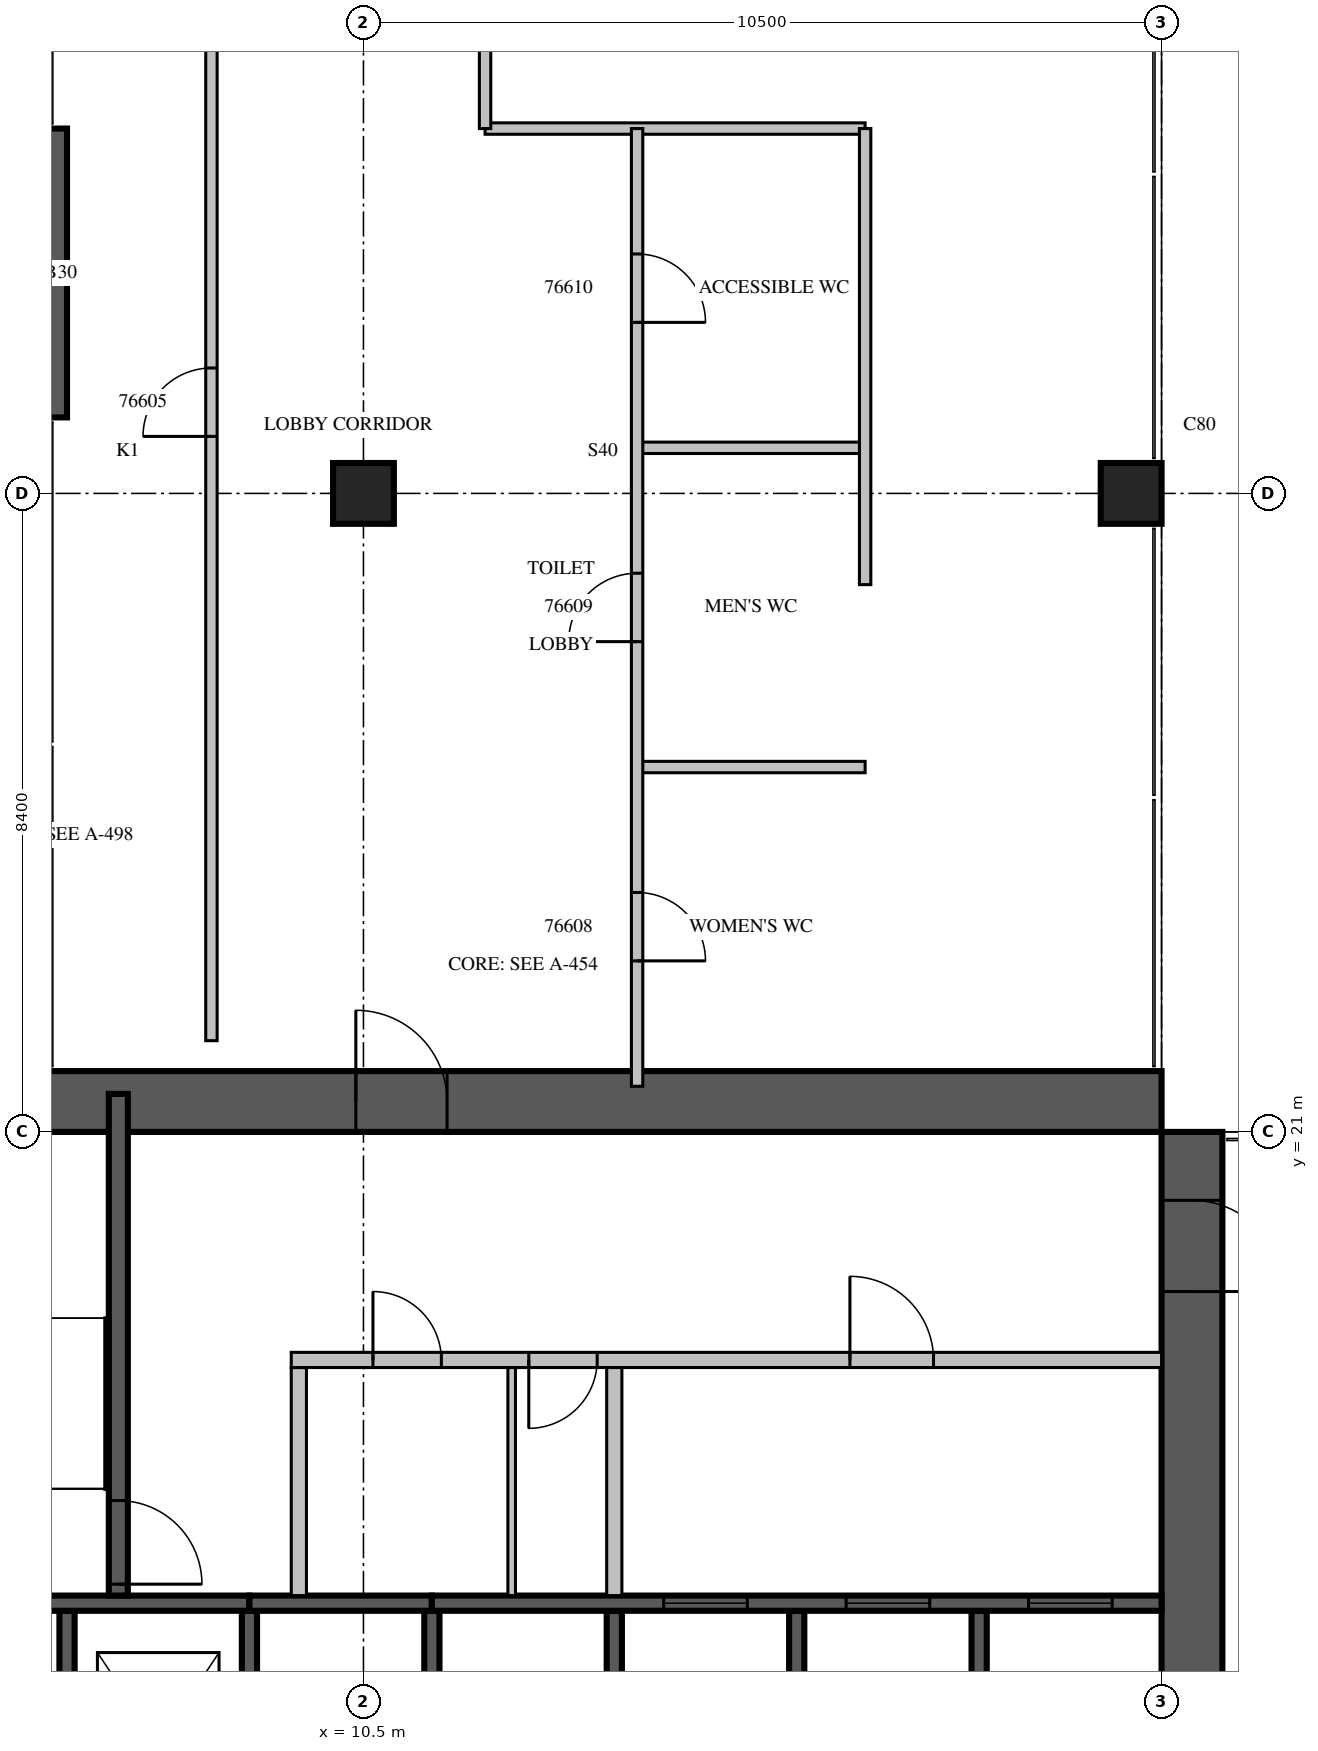
"""IFC4 building model, lengths in metres.
Left out: names, types, materials, properties, quantities, classifications, styles, units other than length and angle.
Written with IfcOpenShell. Run it as: python <this file> out.ifc"""

import sys

from ifc_helpers import new_model, si_unit, direction, frame, frame_2d, origin, origin_2d, place, context, subcontext, project, spatial, rectangle, extrude, source, transform, mapped, element, fill, save


model = new_model("IFC4")
c1 = context("Model", 3, precision=1e-05, world=origin(), true_north=direction((0.0, 1.0)))
c2 = subcontext(c1, "Body", "Model", "MODEL_VIEW")
j1 = project(units=[si_unit("LENGTHUNIT", "METRE"), si_unit("PLANEANGLEUNIT", "RADIAN")], contexts=[c1])
p1 = place(None, origin())
s1 = spatial("IfcSite", under=j1, at=p1, CompositionType="ELEMENT")
p2 = place(p1, origin())
s2 = spatial("IfcBuilding", under=s1, at=p2, CompositionType="ELEMENT")
p3 = place(p2, frame((0.0, 0.0, 277.0)))
s3 = spatial("IfcBuildingStorey", under=s2, at=p3, CompositionType="ELEMENT", Elevation=277.0)
m1 = source(origin(), c2, "Body", "SweptSolid", [
    extrude(rectangle(XDim=0.8, YDim=0.8, at=origin_2d()), origin(), (0.0, 0.0, 1.0), 7.5),
])
for number, where, z_axis, x_axis in (
    (1, (10.5, 29.4, 0.0), (0.0, 0.0, 1.0), (1.0, 0.0, 0.0)),
    (2, (20.6, 29.4, 0.0), (0.0, 0.0, 1.0), (1.0, 0.0, 0.0)),
):
    element("IfcColumn", number, at=place(p3, frame(where, z_axis=z_axis, x_axis=x_axis)), inside=s3, PredefinedType="COLUMN", context=c2, shape_type="MappedRepresentation", body=[
        mapped(m1, transform((0.0, 0.0, 0.0), scale=1.0)),
    ])
p4 = place(p3, frame((21.4, 4.2, 0.0), z_axis=(0.0, 0.0, 1.0), x_axis=(0.0, 1.0, 0.0)))
e3 = element("IfcWall", 3, at=p4, inside=s3, PredefinedType="SHEAR", context=c2, shape_type="SweptSolid", body=[
    extrude(rectangle(XDim=16.8, YDim=0.8, at=frame_2d((8.4, 0.0))), origin(), (0.0, 0.0, 1.0), 7.5),
])
m2 = source(origin(), c2, "Body", "SweptSolid", [
    extrude(rectangle(XDim=2.2, YDim=2.1, at=frame_2d((1.1, 1.05))), frame((0.0, 0.41, 0.0), z_axis=(0.0, -1.0, 0.0), x_axis=(1.0, 0.0, 0.0)), (0.0, 0.0, 1.0), 0.82),
])
p5 = place(p4, frame((4.2, 0.0, 0.0)))
e4 = element("IfcOpeningElement", 4, at=p5, cuts=e3, PredefinedType="OPENING", context=c2, shape_type="MappedRepresentation", body=[
    mapped(m2, transform((0.0, 0.0, 0.0), scale=1.0)),
])
m3 = source(origin(), c2, "Body", "SweptSolid", [
    extrude(rectangle(XDim=1.2, YDim=2.1, at=frame_2d((0.6, 1.05))), frame((0.0, 0.41, 0.0), z_axis=(0.0, -1.0, 0.0), x_axis=(1.0, 0.0, 0.0)), (0.0, 0.0, 1.0), 0.82),
])
p6 = place(p4, frame((14.7, 0.0, 0.0)))
e5 = element("IfcOpeningElement", 5, at=p6, cuts=e3, PredefinedType="OPENING", context=c2, shape_type="MappedRepresentation", body=[
    mapped(m3, transform((0.0, 0.0, 0.0), scale=1.0)),
])
m4 = source(origin(), c2, "Body", "SweptSolid", [
    extrude(rectangle(XDim=16.8, YDim=0.8, at=frame_2d((8.4, 0.0))), origin(), (0.0, 0.0, 1.0), 7.5),
])
p7 = place(p3, frame((4.2, 21.4, 0.0), z_axis=(0.0, 0.0, 1.0), x_axis=(1.0, 0.0, 0.0)))
e6 = element("IfcWall", 6, at=p7, inside=s3, PredefinedType="SHEAR", context=c2, shape_type="MappedRepresentation", body=[
    mapped(m4, transform((0.0, 0.0, 0.0), scale=1.0)),
])
p8 = place(p7, frame((6.2, 0.0, 0.0)))
e7 = element("IfcOpeningElement", 7, at=p8, cuts=e6, PredefinedType="OPENING", context=c2, shape_type="MappedRepresentation", body=[
    mapped(m3, transform((0.0, 0.0, 0.0), scale=1.0)),
])
m5 = source(origin(), c2, "Body", "SweptSolid", [
    extrude(rectangle(XDim=3.8, YDim=0.3, at=frame_2d((1.9, 0.0))), origin(), (0.0, 0.0, 1.0), 7.1),
])
p9 = place(p3, frame((6.45, 34.2, 0.0), z_axis=(0.0, 0.0, 1.0), x_axis=(0.0, -1.0, 0.0)))
e8 = element("IfcWall", 8, at=p9, inside=s3, PredefinedType="SOLIDWALL", context=c2, shape_type="MappedRepresentation", body=[
    mapped(m5, transform((0.0, 0.0, 0.0), scale=1.0)),
])
m6 = source(origin(), c2, "Body", "SweptSolid", [
    extrude(rectangle(XDim=3.0, YDim=0.2, at=frame_2d((1.5, 0.0))), origin(), (0.0, 0.0, 1.0), 7.5),
])
p10 = place(p3, frame((6.6, 11.7, 0.0), z_axis=(0.0, 0.0, 1.0), x_axis=(0.0, 1.0, 0.0)))
e9 = element("IfcWall", 9, at=p10, inside=s3, PredefinedType="SOLIDWALL", context=c2, shape_type="MappedRepresentation", body=[
    mapped(m6, transform((0.0, 0.0, 0.0), scale=1.0)),
])
m7 = source(origin(), c2, "Body", "SweptSolid", [
    extrude(rectangle(XDim=3.0, YDim=0.2, at=frame_2d((1.5, 0.0))), origin(), (0.0, 0.0, 1.0), 7.1),
])
for number, where, z_axis, x_axis in (
    (10, (9.0, 11.7, 0.0), (0.0, 0.0, 1.0), (0.0, 1.0, 0.0)),
    (11, (11.4, 11.7, 0.0), (0.0, 0.0, 1.0), (0.0, 1.0, 0.0)),
):
    element("IfcWall", number, at=place(p3, frame(where, z_axis=z_axis, x_axis=x_axis)), inside=s3, PredefinedType="SOLIDWALL", context=c2, shape_type="MappedRepresentation", body=[
        mapped(m7, transform((0.0, 0.0, 0.0), scale=1.0)),
    ])
for number, where, z_axis, x_axis in (
    (12, (13.8, 11.7, 0.0), (0.0, 0.0, 1.0), (0.0, 1.0, 0.0)),
    (13, (16.2, 11.7, 0.0), (0.0, 0.0, 1.0), (0.0, 1.0, 0.0)),
    (14, (18.6, 11.7, 0.0), (0.0, 0.0, 1.0), (0.0, 1.0, 0.0)),
):
    element("IfcWall", number, at=place(p3, frame(where, z_axis=z_axis, x_axis=x_axis)), inside=s3, PredefinedType="SOLIDWALL", context=c2, shape_type="MappedRepresentation", body=[
        mapped(m6, transform((0.0, 0.0, 0.0), scale=1.0)),
    ])
m8 = source(origin(), c2, "Body", "SweptSolid", [
    extrude(rectangle(XDim=4.8, YDim=0.2, at=frame_2d((2.4, 0.0))), origin(), (0.0, 0.0, 1.0), 7.5),
])
p11 = place(p3, frame((4.2, 14.8, 0.0), z_axis=(0.0, 0.0, 1.0), x_axis=(1.0, 0.0, 0.0)))
e15 = element("IfcWall", 15, at=p11, inside=s3, PredefinedType="SOLIDWALL", context=c2, shape_type="MappedRepresentation", body=[
    mapped(m8, transform((0.0, 0.0, 0.0), scale=1.0)),
])
m9 = source(origin(), c2, "Body", "SweptSolid", [
    extrude(rectangle(XDim=2.4, YDim=0.2, at=frame_2d((1.2, 0.0))), origin(), (0.0, 0.0, 1.0), 7.1),
])
p12 = place(p3, frame((9.0, 14.8, 0.0), z_axis=(0.0, 0.0, 1.0), x_axis=(1.0, 0.0, 0.0)))
e16 = element("IfcWall", 16, at=p12, inside=s3, PredefinedType="SOLIDWALL", context=c2, shape_type="MappedRepresentation", body=[
    mapped(m9, transform((0.0, 0.0, 0.0), scale=1.0)),
])
m10 = source(origin(), c2, "Body", "SweptSolid", [
    extrude(rectangle(XDim=9.6, YDim=0.2, at=frame_2d((4.8, 0.0))), origin(), (0.0, 0.0, 1.0), 7.5),
])
p13 = place(p3, frame((11.4, 14.8, 0.0), z_axis=(0.0, 0.0, 1.0), x_axis=(1.0, 0.0, 0.0)))
e17 = element("IfcWall", 17, at=p13, inside=s3, PredefinedType="SOLIDWALL", context=c2, shape_type="MappedRepresentation", body=[
    mapped(m10, transform((0.0, 0.0, 0.0), scale=1.0)),
])
m11 = source(origin(), c2, "Body", "SweptSolid", [
    extrude(rectangle(XDim=1.1, YDim=2.1, at=frame_2d((0.55, 1.05))), frame((0.0, 0.11, 0.0), z_axis=(0.0, -1.0, 0.0), x_axis=(1.0, 0.0, 0.0)), (0.0, 0.0, 1.0), 0.22),
])
p14 = place(p13, frame((3.05, 0.0, 0.0)))
e18 = element("IfcOpeningElement", 18, at=p14, cuts=e17, PredefinedType="OPENING", context=c2, shape_type="MappedRepresentation", body=[
    mapped(m11, transform((0.0, 0.0, 0.0), scale=1.0)),
])
p15 = place(p13, frame((5.45, 0.0, 0.0)))
e19 = element("IfcOpeningElement", 19, at=p15, cuts=e17, PredefinedType="OPENING", context=c2, shape_type="MappedRepresentation", body=[
    mapped(m11, transform((0.0, 0.0, 0.0), scale=1.0)),
])
p16 = place(p13, frame((7.85, 0.0, 0.0)))
e20 = element("IfcOpeningElement", 20, at=p16, cuts=e17, PredefinedType="OPENING", context=c2, shape_type="MappedRepresentation", body=[
    mapped(m11, transform((0.0, 0.0, 0.0), scale=1.0)),
])
m12 = source(origin(), c2, "Body", "SweptSolid", [
    extrude(rectangle(XDim=6.6, YDim=0.25, at=frame_2d((3.3, 0.0))), origin(), (0.0, 0.0, 1.0), 7.1),
])
p17 = place(p3, frame((7.275, 14.9, 0.0), z_axis=(0.0, 0.0, 1.0), x_axis=(0.0, 1.0, 0.0)))
e21 = element("IfcWall", 21, at=p17, inside=s3, PredefinedType="SOLIDWALL", context=c2, shape_type="MappedRepresentation", body=[
    mapped(m12, transform((0.0, 0.0, 0.0), scale=1.0)),
])
m13 = source(origin(), c2, "Body", "SweptSolid", [
    extrude(rectangle(XDim=1.1, YDim=2.1, at=frame_2d((0.55, 1.05))), frame((0.0, 0.135, 0.0), z_axis=(0.0, -1.0, 0.0), x_axis=(1.0, 0.0, 0.0)), (0.0, 0.0, 1.0), 0.27),
])
p18 = place(p17, frame((0.15, 0.0, 0.0)))
e22 = element("IfcOpeningElement", 22, at=p18, cuts=e21, PredefinedType="OPENING", context=c2, shape_type="MappedRepresentation", body=[
    mapped(m13, transform((0.0, 0.0, 0.0), scale=1.0)),
])
m14 = source(origin(), c2, "Body", "SweptSolid", [
    extrude(rectangle(XDim=3.0, YDim=0.2, at=frame_2d((1.5, 0.0))), origin(), (0.0, 0.0, 1.0), 7.1),
])
p19 = place(p3, frame((9.65, 14.9, 0.0), z_axis=(0.0, 0.0, 1.0), x_axis=(0.0, 1.0, 0.0)))
e23 = element("IfcWall", 23, at=p19, inside=s3, PredefinedType="PARTITIONING", context=c2, shape_type="MappedRepresentation", body=[
    mapped(m14, transform((0.0, 0.0, 0.0), scale=1.0)),
])
m15 = source(origin(), c2, "Body", "SweptSolid", [
    extrude(rectangle(XDim=11.45, YDim=0.2, at=frame_2d((5.725, 0.0))), origin(), (0.0, 0.0, 1.0), 7.1),
])
p20 = place(p3, frame((9.55, 18.0, 0.0), z_axis=(0.0, 0.0, 1.0), x_axis=(1.0, 0.0, 0.0)))
e24 = element("IfcWall", 24, at=p20, inside=s3, PredefinedType="PARTITIONING", context=c2, shape_type="MappedRepresentation", body=[
    mapped(m15, transform((0.0, 0.0, 0.0), scale=1.0)),
])
m16 = source(origin(), c2, "Body", "SweptSolid", [
    extrude(rectangle(XDim=0.9, YDim=2.1, at=frame_2d((0.45, 1.05))), frame((0.0, 0.11, 0.0), z_axis=(0.0, -1.0, 0.0), x_axis=(1.0, 0.0, 0.0)), (0.0, 0.0, 1.0), 0.22),
])
p21 = place(p20, frame((1.075, 0.0, 0.0)))
e25 = element("IfcOpeningElement", 25, at=p21, cuts=e24, PredefinedType="OPENING", context=c2, shape_type="MappedRepresentation", body=[
    mapped(m16, transform((0.0, 0.0, 0.0), scale=1.0)),
])
p22 = place(p20, frame((3.125, 0.0, 0.0)))
e26 = element("IfcOpeningElement", 26, at=p22, cuts=e24, PredefinedType="OPENING", context=c2, shape_type="MappedRepresentation", body=[
    mapped(m16, transform((0.0, 0.0, 0.0), scale=1.0)),
])
p23 = place(p20, frame((7.35, 0.0, 0.0)))
e27 = element("IfcOpeningElement", 27, at=p23, cuts=e24, PredefinedType="OPENING", context=c2, shape_type="MappedRepresentation", body=[
    mapped(m11, transform((0.0, 0.0, 0.0), scale=1.0)),
])
p24 = place(p3, frame((13.8, 14.9, 0.0), z_axis=(0.0, 0.0, 1.0), x_axis=(0.0, 1.0, 0.0)))
e28 = element("IfcWall", 28, at=p24, inside=s3, PredefinedType="PARTITIONING", context=c2, shape_type="MappedRepresentation", body=[
    mapped(m14, transform((0.0, 0.0, 0.0), scale=1.0)),
])
m17 = source(origin(), c2, "Body", "SweptSolid", [
    extrude(rectangle(XDim=3.0, YDim=0.1, at=frame_2d((1.5, 0.0))), origin(), (0.0, 0.0, 1.0), 7.1),
])
p25 = place(p3, frame((12.45, 14.9, 0.0), z_axis=(0.0, 0.0, 1.0), x_axis=(0.0, 1.0, 0.0)))
e29 = element("IfcWall", 29, at=p25, inside=s3, PredefinedType="PARTITIONING", context=c2, shape_type="MappedRepresentation", body=[
    mapped(m17, transform((0.0, 0.0, 0.0), scale=1.0)),
])
m18 = source(origin(), c2, "Body", "SweptSolid", [
    extrude(rectangle(XDim=3.0, YDim=0.15, at=frame_2d((1.5, 0.0))), origin(), (0.0, 0.0, 1.0), 7.1),
])
for number, where, z_axis, x_axis in (
    (30, (14.1, 25.8, 0.0), (0.0, 0.0, 1.0), (1.0, 0.0, 0.0)),
    (31, (14.1, 30.0, 0.0), (0.0, 0.0, 1.0), (1.0, 0.0, 0.0)),
):
    element("IfcWall", number, at=place(p3, frame(where, z_axis=z_axis, x_axis=x_axis)), inside=s3, PredefinedType="PARTITIONING", context=c2, shape_type="MappedRepresentation", body=[
        mapped(m18, transform((0.0, 0.0, 0.0), scale=1.0)),
    ])
m19 = source(origin(), c2, "Body", "SweptSolid", [
    extrude(rectangle(XDim=5.0, YDim=0.15, at=frame_2d((2.5, 0.0))), origin(), (0.0, 0.0, 1.0), 7.1),
])
p26 = place(p3, frame((12.1, 34.2, 0.0), z_axis=(0.0, 0.0, 1.0), x_axis=(1.0, 0.0, 0.0)))
e32 = element("IfcWall", 32, at=p26, inside=s3, PredefinedType="PARTITIONING", context=c2, shape_type="MappedRepresentation", body=[
    mapped(m19, transform((0.0, 0.0, 0.0), scale=1.0)),
])
m20 = source(origin(), c2, "Body", "SweptSolid", [
    extrude(rectangle(XDim=16.2, YDim=0.15, at=frame_2d((8.1, 0.0))), origin(), (0.0, 0.0, 1.0), 7.1),
])
p27 = place(p3, frame((8.5, 22.2, 0.0), z_axis=(0.0, 0.0, 1.0), x_axis=(0.0, 1.0, 0.0)))
e33 = element("IfcWall", 33, at=p27, inside=s3, PredefinedType="PARTITIONING", context=c2, shape_type="MappedRepresentation", body=[
    mapped(m20, transform((0.0, 0.0, 0.0), scale=1.0)),
])
m21 = source(origin(), c2, "Body", "SweptSolid", [
    extrude(rectangle(XDim=0.9, YDim=2.1, at=frame_2d((0.45, 1.05))), frame((0.0, 0.085, 0.0), z_axis=(0.0, -1.0, 0.0), x_axis=(1.0, 0.0, 0.0)), (0.0, 0.0, 1.0), 0.17),
])
p28 = place(p27, frame((7.95, 0.0, 0.0)))
e34 = element("IfcOpeningElement", 34, at=p28, cuts=e33, PredefinedType="OPENING", context=c2, shape_type="MappedRepresentation", body=[
    mapped(m21, transform((0.0, 0.0, 0.0), scale=1.0)),
])
p29 = place(p3, frame((12.1, 34.2, 0.0), z_axis=(0.0, 0.0, 1.0), x_axis=(0.0, 1.0, 0.0)))
e35 = element("IfcWall", 35, at=p29, inside=s3, PredefinedType="PARTITIONING", context=c2, shape_type="SweptSolid", body=[
    extrude(rectangle(XDim=4.2, YDim=0.15, at=frame_2d((2.1, 0.0))), origin(), (0.0, 0.0, 1.0), 7.1),
])
m22 = source(origin(), c2, "Body", "SweptSolid", [
    extrude(rectangle(XDim=12.6, YDim=0.15, at=frame_2d((6.3, 0.0))), origin(), (0.0, 0.0, 1.0), 7.1),
])
p30 = place(p3, frame((14.1, 21.6, 0.0), z_axis=(0.0, 0.0, 1.0), x_axis=(0.0, 1.0, 0.0)))
e36 = element("IfcWall", 36, at=p30, inside=s3, PredefinedType="PARTITIONING", context=c2, shape_type="MappedRepresentation", body=[
    mapped(m22, transform((0.0, 0.0, 0.0), scale=1.0)),
])
p31 = place(p30, frame((1.65, 0.0, 0.0)))
e37 = element("IfcOpeningElement", 37, at=p31, cuts=e36, PredefinedType="OPENING", context=c2, shape_type="MappedRepresentation", body=[
    mapped(m21, transform((0.0, 0.0, 0.0), scale=1.0)),
])
p32 = place(p30, frame((5.85, 0.0, 0.0)))
e38 = element("IfcOpeningElement", 38, at=p32, cuts=e36, PredefinedType="OPENING", context=c2, shape_type="MappedRepresentation", body=[
    mapped(m21, transform((0.0, 0.0, 0.0), scale=1.0)),
])
p33 = place(p30, frame((10.05, 0.0, 0.0)))
e39 = element("IfcOpeningElement", 39, at=p33, cuts=e36, PredefinedType="OPENING", context=c2, shape_type="MappedRepresentation", body=[
    mapped(m21, transform((0.0, 0.0, 0.0), scale=1.0)),
])
m23 = source(origin(), c2, "Body", "SweptSolid", [
    extrude(rectangle(XDim=6.0, YDim=0.15, at=frame_2d((3.0, 0.0))), origin(), (0.0, 0.0, 1.0), 7.1),
])
p34 = place(p3, frame((17.1, 28.2, 0.0), z_axis=(0.0, 0.0, 1.0), x_axis=(0.0, 1.0, 0.0)))
e40 = element("IfcWall", 40, at=p34, inside=s3, PredefinedType="PARTITIONING", context=c2, shape_type="MappedRepresentation", body=[
    mapped(m23, transform((0.0, 0.0, 0.0), scale=1.0)),
])
m24 = source(origin(), c2, "Body", "SweptSolid", [
    extrude(rectangle(XDim=1.1, YDim=2.1, at=frame_2d((0.55, 1.05))), frame((0.0, 0.025, 0.0), z_axis=(0.0, -1.0, 0.0), x_axis=(1.0, 0.0, 0.0)), (0.0, 0.0, 1.0), 0.05),
])
p35 = place(p14, origin())
e41 = element("IfcDoor", 41, at=p35, inside=s3, OperationType="SLIDING_TO_LEFT", PredefinedType="DOOR", context=c2, shape_type="MappedRepresentation", body=[
    mapped(m24, transform((0.0, 0.0, 0.0), scale=1.0)),
])
fill(e18, e41)
p36 = place(p15, origin())
e42 = element("IfcDoor", 42, at=p36, inside=s3, OperationType="SLIDING_TO_LEFT", PredefinedType="DOOR", context=c2, shape_type="MappedRepresentation", body=[
    mapped(m24, transform((0.0, 0.0, 0.0), scale=1.0)),
])
fill(e19, e42)
p37 = place(p16, origin())
e43 = element("IfcDoor", 43, at=p37, inside=s3, OperationType="SLIDING_TO_LEFT", PredefinedType="DOOR", context=c2, shape_type="MappedRepresentation", body=[
    mapped(m24, transform((0.0, 0.0, 0.0), scale=1.0)),
])
fill(e20, e43)
p38 = place(p18, origin())
e44 = element("IfcDoor", 44, at=p38, inside=s3, OperationType="SINGLE_SWING_RIGHT", PredefinedType="DOOR", context=c2, shape_type="MappedRepresentation", body=[
    mapped(m24, transform((0.0, 0.0, 0.0), scale=1.0)),
])
fill(e22, e44)
m25 = source(origin(), c2, "Body", "SweptSolid", [
    extrude(rectangle(XDim=0.9, YDim=2.1, at=frame_2d((0.45, 1.05))), frame((0.0, 0.025, 0.0), z_axis=(0.0, -1.0, 0.0), x_axis=(1.0, 0.0, 0.0)), (0.0, 0.0, 1.0), 0.05),
])
p39 = place(p21, origin())
e45 = element("IfcDoor", 45, at=p39, inside=s3, OperationType="SINGLE_SWING_LEFT", PredefinedType="DOOR", context=c2, shape_type="MappedRepresentation", body=[
    mapped(m25, transform((0.0, 0.0, 0.0), scale=1.0)),
])
fill(e25, e45)
p40 = place(p22, origin())
e46 = element("IfcDoor", 46, at=p40, inside=s3, OperationType="SINGLE_SWING_RIGHT", PredefinedType="DOOR", context=c2, shape_type="MappedRepresentation", body=[
    mapped(m25, transform((0.0, 0.0, 0.0), scale=1.0)),
])
fill(e26, e46)
p41 = place(p23, origin())
e47 = element("IfcDoor", 47, at=p41, inside=s3, OperationType="SINGLE_SWING_LEFT", PredefinedType="DOOR", context=c2, shape_type="MappedRepresentation", body=[
    mapped(m24, transform((0.0, 0.0, 0.0), scale=1.0)),
])
fill(e27, e47)
m26 = source(origin(), c2, "Body", "SweptSolid", [
    extrude(rectangle(XDim=1.2, YDim=2.1, at=frame_2d((0.6, 1.05))), frame((0.0, 0.025, 0.0), z_axis=(0.0, -1.0, 0.0), x_axis=(1.0, 0.0, 0.0)), (0.0, 0.0, 1.0), 0.05),
])
p42 = place(p8, origin())
e48 = element("IfcDoor", 48, at=p42, inside=s3, OperationType="SINGLE_SWING_LEFT", PredefinedType="DOOR", context=c2, shape_type="MappedRepresentation", body=[
    mapped(m26, transform((0.0, 0.0, 0.0), scale=1.0)),
])
fill(e7, e48)
p43 = place(p6, origin())
e49 = element("IfcDoor", 49, at=p43, inside=s3, OperationType="SINGLE_SWING_RIGHT", PredefinedType="DOOR", context=c2, shape_type="MappedRepresentation", body=[
    mapped(m26, transform((0.0, 0.0, 0.0), scale=1.0)),
])
fill(e5, e49)
p44 = place(p28, origin())
e50 = element("IfcDoor", 50, at=p44, inside=s3, OperationType="SINGLE_SWING_LEFT", PredefinedType="DOOR", context=c2, shape_type="MappedRepresentation", body=[
    mapped(m25, transform((0.0, 0.0, 0.0), scale=1.0)),
])
fill(e34, e50)
p45 = place(p31, origin())
e51 = element("IfcDoor", 51, at=p45, inside=s3, OperationType="SINGLE_SWING_RIGHT", PredefinedType="DOOR", context=c2, shape_type="MappedRepresentation", body=[
    mapped(m25, transform((0.0, 0.0, 0.0), scale=1.0)),
])
fill(e37, e51)
p46 = place(p32, origin())
e52 = element("IfcDoor", 52, at=p46, inside=s3, OperationType="SINGLE_SWING_LEFT", PredefinedType="DOOR", context=c2, shape_type="MappedRepresentation", body=[
    mapped(m25, transform((0.0, 0.0, 0.0), scale=1.0)),
])
fill(e38, e52)
p47 = place(p33, origin())
e53 = element("IfcDoor", 53, at=p47, inside=s3, OperationType="SINGLE_SWING_RIGHT", PredefinedType="DOOR", context=c2, shape_type="MappedRepresentation", body=[
    mapped(m25, transform((0.0, 0.0, 0.0), scale=1.0)),
])
fill(e39, e53)
save(model, sys.argv[1])
